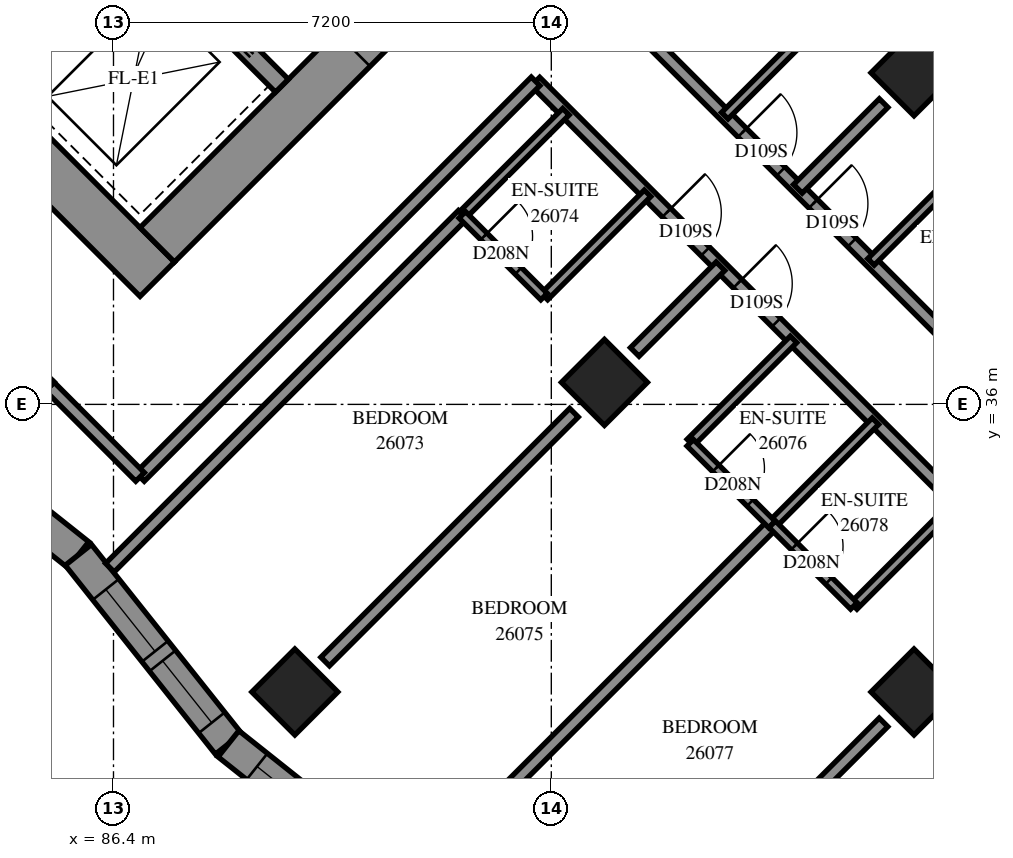
"""IFC4 building model, lengths in metres.
Left out: names, types, materials, properties, quantities, classifications, styles, units other than length and angle.
Written with IfcOpenShell. Run it as: python <this file> out.ifc"""

import sys

from ifc_helpers import new_model, si_unit, direction, frame, frame_2d, origin, origin_2d, place, context, subcontext, project, spatial, polyline, rectangle, outline, extrude, element, fill, save


model = new_model("IFC4")
c1 = context("Model", 3, precision=1e-05, world=origin(), true_north=direction((0.0, 1.0)))
c2 = subcontext(c1, "Body", "Model", "MODEL_VIEW")
j1 = project(units=[si_unit("LENGTHUNIT", "METRE"), si_unit("PLANEANGLEUNIT", "RADIAN")], contexts=[c1])
p1 = place(None, origin())
s1 = spatial("IfcSite", under=j1, at=p1, CompositionType="ELEMENT")
p2 = place(p1, origin())
s2 = spatial("IfcBuilding", under=s1, at=p2, CompositionType="ELEMENT")
p3 = place(p2, frame((0.0, 0.0, 98.2)))
s3 = spatial("IfcBuildingStorey", under=s2, at=p3, CompositionType="ELEMENT", Elevation=98.2)
for number, where, z_axis, x_axis in (
    (1, (99.565, 41.453, 0.0), (0.0, 0.0, 1.0), (0.707, -0.707, 0.0)),
    (2, (94.474, 36.362, 0.0), (0.0, 0.0, 1.0), (0.707, -0.707, 0.0)),
    (3, (89.382, 31.271, 0.0), (0.0, 0.0, 1.0), (0.707, -0.707, 0.0)),
    (4, (99.565, 31.271, 0.0), (0.0, 0.0, 1.0), (0.707, -0.707, 0.0)),
):
    element("IfcColumn", number, at=place(p3, frame(where, z_axis=z_axis, x_axis=x_axis)), inside=s3, PredefinedType="COLUMN", context=c2, shape_type="SweptSolid", body=[
        extrude(rectangle(XDim=1.0, YDim=1.0, at=origin_2d()), origin(), (0.0, 0.0, 1.0), 3.1),
    ])
p4 = place(p3, frame((75.806, 49.373, -0.3), z_axis=(0.0, 0.0, 1.0), x_axis=(0.7071067812, -0.7071067812, 0.0)))
e5 = element("IfcWall", 5, at=p4, inside=s3, PredefinedType="SHEAR", context=c2, shape_type="SweptSolid", body=[
    extrude(rectangle(XDim=16.0, YDim=0.8, at=frame_2d((8.0, 0.0))), origin(), (0.0, 0.0, 1.0), 2.7),
])
p5 = place(p3, frame((87.12, 38.625, -0.3), z_axis=(0.0, 0.0, 1.0), x_axis=(0.7071067812, 0.7071067812, 0.0)))
e6 = element("IfcWall", 6, at=p5, inside=s3, PredefinedType="SHEAR", context=c2, shape_type="SweptSolid", body=[
    extrude(rectangle(XDim=14.4, YDim=0.8, at=frame_2d((7.2, 0.0))), origin(), (0.0, 0.0, 1.0), 2.7),
])
p6 = place(p5, frame((4.55, 0.0, 0.3)))
e7 = element("IfcOpeningElement", 7, at=p6, cuts=e6, PredefinedType="OPENING", context=c2, shape_type="SweptSolid", body=[
    extrude(rectangle(XDim=1.1, YDim=2.1, at=frame_2d((0.55, 1.05))), frame((0.0, 0.41, 0.0), z_axis=(0.0, -1.0, 0.0), x_axis=(1.0, 0.0, 0.0)), (0.0, 0.0, 1.0), 0.82),
])
p7 = place(p5, frame((11.35, 0.0, 0.3)))
e8 = element("IfcOpeningElement", 8, at=p7, cuts=e6, PredefinedType="OPENING", context=c2, shape_type="SweptSolid", body=[
    extrude(rectangle(XDim=1.1, YDim=2.1, at=frame_2d((0.55, 1.05))), frame((0.0, 0.41, 0.0), z_axis=(0.0, -1.0, 0.0), x_axis=(1.0, 0.0, 0.0)), (0.0, 0.0, 1.0), 0.82),
])
p8 = place(p3, frame((84.291, 41.453, 0.0), z_axis=(0.0, 0.0, 1.0), x_axis=(0.7071067812, 0.7071067812, 0.0)))
e9 = element("IfcWall", 9, at=p8, inside=s3, PredefinedType="SOLIDWALL", context=c2, shape_type="SweptSolid", body=[
    extrude(rectangle(XDim=3.3, YDim=0.3, at=frame_2d((1.65, 0.0))), origin(), (0.0, 0.0, 1.0), 3.1),
])
p9 = place(p3, frame((78.988, 51.423, 0.0), z_axis=(0.0, 0.0, 1.0), x_axis=(0.7071067812, -0.7071067812, 0.0)))
e10 = element("IfcWall", 10, at=p9, inside=s3, PredefinedType="SOLIDWALL", context=c2, shape_type="SweptSolid", body=[
    extrude(rectangle(XDim=14.4, YDim=0.3, at=frame_2d((7.2, 0.0))), origin(), (0.0, 0.0, 1.0), 3.1),
])
p10 = place(p9, frame((1.25, 0.0, 0.0)))
e11 = element("IfcOpeningElement", 11, at=p10, cuts=e10, PredefinedType="OPENING", context=c2, shape_type="SweptSolid", body=[
    extrude(rectangle(XDim=1.1, YDim=2.1, at=frame_2d((0.55, 1.05))), frame((0.0, 0.16, 0.0), z_axis=(0.0, -1.0, 0.0), x_axis=(1.0, 0.0, 0.0)), (0.0, 0.0, 1.0), 0.32),
])
p11 = place(p9, frame((4.85, 0.0, 0.0)))
e12 = element("IfcOpeningElement", 12, at=p11, cuts=e10, PredefinedType="OPENING", context=c2, shape_type="SweptSolid", body=[
    extrude(rectangle(XDim=1.1, YDim=2.1, at=frame_2d((0.55, 1.05))), frame((0.0, 0.16, 0.0), z_axis=(0.0, -1.0, 0.0), x_axis=(1.0, 0.0, 0.0)), (0.0, 0.0, 1.0), 0.32),
])
p12 = place(p9, frame((8.45, 0.0, 0.0)))
e13 = element("IfcOpeningElement", 13, at=p12, cuts=e10, PredefinedType="OPENING", context=c2, shape_type="SweptSolid", body=[
    extrude(rectangle(XDim=1.1, YDim=2.1, at=frame_2d((0.55, 1.05))), frame((0.0, 0.16, 0.0), z_axis=(0.0, -1.0, 0.0), x_axis=(1.0, 0.0, 0.0)), (0.0, 0.0, 1.0), 0.32),
])
p13 = place(p9, frame((12.05, 0.0, 0.0)))
e14 = element("IfcOpeningElement", 14, at=p13, cuts=e10, PredefinedType="OPENING", context=c2, shape_type="SweptSolid", body=[
    extrude(rectangle(XDim=1.1, YDim=2.1, at=frame_2d((0.55, 1.05))), frame((0.0, 0.16, 0.0), z_axis=(0.0, -1.0, 0.0), x_axis=(1.0, 0.0, 0.0)), (0.0, 0.0, 1.0), 0.32),
])
p14 = place(p3, frame((82.716, 35.994, 0.0), z_axis=(0.0, 0.0, 1.0), x_axis=(0.7828931284, -0.6221562099, 0.0)))
e15 = element("IfcWall", 15, at=p14, inside=s3, PredefinedType="SOLIDWALL", context=c2, shape_type="SweptSolid", body=[
    extrude(outline(polyline([(-0.032, -0.275), (3.937, -0.275), (3.999, 0.275), (0.032, 0.275), (-0.032, -0.275)])), origin(), (0.0, 0.0, 1.0), 3.1),
])
p15 = place(p14, frame((1.714, 0.0, 0.5)))
e16 = element("IfcOpeningElement", 16, at=p15, cuts=e15, PredefinedType="OPENING", context=c2, shape_type="SweptSolid", body=[
    extrude(rectangle(XDim=1.2, YDim=2.45, at=frame_2d((0.6, 1.225))), frame((0.0, 0.285, 0.0), z_axis=(0.0, -1.0, 0.0), x_axis=(1.0, 0.0, 0.0)), (0.0, 0.0, 1.0), 0.57),
])
p16 = place(p3, frame((85.822, 33.525, 0.0), z_axis=(0.0, 0.0, 1.0), x_axis=(0.6221562099, -0.7828931284, 0.0)))
e17 = element("IfcWall", 17, at=p16, inside=s3, PredefinedType="SOLIDWALL", context=c2, shape_type="SweptSolid", body=[
    extrude(outline(polyline([(0.032, -0.275), (3.999, -0.275), (3.937, 0.275), (-0.032, 0.275), (0.032, -0.275)])), origin(), (0.0, 0.0, 1.0), 3.1),
])
p17 = place(p16, frame((0.726, 0.0, 0.5)))
e18 = element("IfcOpeningElement", 18, at=p17, cuts=e17, PredefinedType="OPENING", context=c2, shape_type="SweptSolid", body=[
    extrude(rectangle(XDim=1.3, YDim=2.45, at=frame_2d((0.65, 1.225))), frame((0.0, 0.285, 0.0), z_axis=(0.0, -1.0, 0.0), x_axis=(1.0, 0.0, 0.0)), (0.0, 0.0, 1.0), 0.57),
])
p18 = place(p16, frame((2.226, 0.0, 0.5)))
e19 = element("IfcOpeningElement", 19, at=p18, cuts=e17, PredefinedType="OPENING", context=c2, shape_type="SweptSolid", body=[
    extrude(rectangle(XDim=1.3, YDim=2.45, at=frame_2d((0.65, 1.225))), frame((0.0, 0.285, 0.0), z_axis=(0.0, -1.0, 0.0), x_axis=(1.0, 0.0, 0.0)), (0.0, 0.0, 1.0), 0.57),
])
p19 = place(p3, frame((88.291, 30.419, 0.0), z_axis=(0.0, 0.0, 1.0), x_axis=(0.7829028832, -0.6221439347, 0.0)))
e20 = element("IfcWall", 20, at=p19, inside=s3, PredefinedType="SOLIDWALL", context=c2, shape_type="SweptSolid", body=[
    extrude(outline(polyline([(-0.032, -0.275), (3.937, -0.275), (3.999, 0.275), (0.032, 0.275), (-0.032, -0.275)])), origin(), (0.0, 0.0, 1.0), 3.1),
])
p20 = place(p19, frame((0.6, 0.0, 0.5)))
e21 = element("IfcOpeningElement", 21, at=p20, cuts=e20, PredefinedType="OPENING", context=c2, shape_type="SweptSolid", body=[
    extrude(rectangle(XDim=1.3, YDim=2.45, at=frame_2d((0.65, 1.225))), frame((0.0, 0.285, 0.0), z_axis=(0.0, -1.0, 0.0), x_axis=(1.0, 0.0, 0.0)), (0.0, 0.0, 1.0), 0.57),
])
p21 = place(p19, frame((2.1, 0.0, 0.5)))
e22 = element("IfcOpeningElement", 22, at=p21, cuts=e20, PredefinedType="OPENING", context=c2, shape_type="SweptSolid", body=[
    extrude(rectangle(XDim=1.3, YDim=2.45, at=frame_2d((0.65, 1.225))), frame((0.0, 0.285, 0.0), z_axis=(0.0, -1.0, 0.0), x_axis=(1.0, 0.0, 0.0)), (0.0, 0.0, 1.0), 0.57),
])
p22 = place(p3, frame((93.339, 41.309, 0.0), z_axis=(0.0, 0.0, 1.0), x_axis=(0.7071067812, -0.7071067812, 0.0)))
e23 = element("IfcWall", 23, at=p22, inside=s3, PredefinedType="PARTITIONING", context=c2, shape_type="SweptSolid", body=[
    extrude(rectangle(XDim=18.702, YDim=0.2, at=frame_2d((9.351, 0.0))), origin(), (0.0, 0.0, 1.0), 3.1),
])
p23 = place(p22, frame((3.05, 0.0, 0.0)))
e24 = element("IfcOpeningElement", 24, at=p23, cuts=e23, PredefinedType="OPENING", context=c2, shape_type="SweptSolid", body=[
    extrude(rectangle(XDim=0.9, YDim=2.1, at=frame_2d((0.45, 1.05))), frame((0.0, 0.11, 0.0), z_axis=(0.0, -1.0, 0.0), x_axis=(1.0, 0.0, 0.0)), (0.0, 0.0, 1.0), 0.22),
])
p24 = place(p22, frame((4.7, 0.0, 0.0)))
e25 = element("IfcOpeningElement", 25, at=p24, cuts=e23, PredefinedType="OPENING", context=c2, shape_type="SweptSolid", body=[
    extrude(rectangle(XDim=0.9, YDim=2.1, at=frame_2d((0.45, 1.05))), frame((0.0, 0.11, 0.0), z_axis=(0.0, -1.0, 0.0), x_axis=(1.0, 0.0, 0.0)), (0.0, 0.0, 1.0), 0.22),
])
p25 = place(p22, frame((10.149, 0.0, 0.0)))
e26 = element("IfcOpeningElement", 26, at=p25, cuts=e23, PredefinedType="OPENING", context=c2, shape_type="SweptSolid", body=[
    extrude(rectangle(XDim=0.9, YDim=2.1, at=frame_2d((0.45, 1.05))), frame((0.0, 0.11, 0.0), z_axis=(0.0, -1.0, 0.0), x_axis=(1.0, 0.0, 0.0)), (0.0, 0.0, 1.0), 0.22),
])
p26 = place(p22, frame((11.9, 0.0, 0.0)))
e27 = element("IfcOpeningElement", 27, at=p26, cuts=e23, PredefinedType="OPENING", context=c2, shape_type="SweptSolid", body=[
    extrude(rectangle(XDim=0.9, YDim=2.1, at=frame_2d((0.45, 1.05))), frame((0.0, 0.11, 0.0), z_axis=(0.0, -1.0, 0.0), x_axis=(1.0, 0.0, 0.0)), (0.0, 0.0, 1.0), 0.22),
])
p27 = place(p22, frame((17.45, 0.0, 0.0)))
e28 = element("IfcOpeningElement", 28, at=p27, cuts=e23, PredefinedType="OPENING", context=c2, shape_type="SweptSolid", body=[
    extrude(rectangle(XDim=0.9, YDim=2.1, at=frame_2d((0.45, 1.05))), frame((0.0, 0.11, 0.0), z_axis=(0.0, -1.0, 0.0), x_axis=(1.0, 0.0, 0.0)), (0.0, 0.0, 1.0), 0.22),
])
p28 = place(p3, frame((86.835, 34.806, 0.0), z_axis=(0.0, 0.0, 1.0), x_axis=(0.7071067812, 0.7071067812, 0.0)))
e29 = element("IfcWall", 29, at=p28, inside=s3, PredefinedType="PARTITIONING", context=c2, shape_type="SweptSolid", body=[
    extrude(rectangle(XDim=9.201, YDim=0.2, at=frame_2d((4.601, 0.0))), origin(), (0.0, 0.0, 1.0), 3.1),
])
p29 = place(p3, frame((86.341, 33.315, 0.0), z_axis=(0.0, 0.0, 1.0), x_axis=(0.7069849041, 0.7072286373, 0.0)))
e30 = element("IfcWall", 30, at=p29, inside=s3, PredefinedType="PARTITIONING", context=c2, shape_type="SweptSolid", body=[
    extrude(rectangle(XDim=8.206, YDim=0.2, at=frame_2d((4.103, 0.0))), origin(), (0.0, 0.0, 1.0), 3.1),
])
p30 = place(p3, frame((91.46, 28.252, 0.0), z_axis=(0.0, 0.0, 1.0), x_axis=(0.7072292282, 0.706984313, 0.0)))
e31 = element("IfcWall", 31, at=p30, inside=s3, PredefinedType="PARTITIONING", context=c2, shape_type="SweptSolid", body=[
    extrude(rectangle(XDim=8.166, YDim=0.2, at=frame_2d((4.083, 0.0))), origin(), (0.0, 0.0, 1.0), 3.1),
])
p31 = place(p3, frame((94.62, 42.587, 0.0), z_axis=(0.0, 0.0, 1.0), x_axis=(0.7071067812, -0.7071067812, 0.0)))
e32 = element("IfcWall", 32, at=p31, inside=s3, PredefinedType="PARTITIONING", context=c2, shape_type="SweptSolid", body=[
    extrude(rectangle(XDim=7.9, YDim=0.2, at=frame_2d((3.95, 0.0))), origin(), (0.0, 0.0, 1.0), 3.1),
])
p32 = place(p31, frame((2.998, 0.0, 0.0)))
e33 = element("IfcOpeningElement", 33, at=p32, cuts=e32, PredefinedType="OPENING", context=c2, shape_type="SweptSolid", body=[
    extrude(rectangle(XDim=0.9, YDim=2.1, at=frame_2d((0.45, 1.05))), frame((0.0, 0.11, 0.0), z_axis=(0.0, -1.0, 0.0), x_axis=(1.0, 0.0, 0.0)), (0.0, 0.0, 1.0), 0.22),
])
p33 = place(p31, frame((4.649, 0.0, 0.0)))
e34 = element("IfcOpeningElement", 34, at=p33, cuts=e32, PredefinedType="OPENING", context=c2, shape_type="SweptSolid", body=[
    extrude(rectangle(XDim=0.9, YDim=2.1, at=frame_2d((0.45, 1.05))), frame((0.0, 0.11, 0.0), z_axis=(0.0, -1.0, 0.0), x_axis=(1.0, 0.0, 0.0)), (0.0, 0.0, 1.0), 0.22),
])
p34 = place(p3, frame((89.881, 31.771, 0.0), z_axis=(0.0, 0.0, 1.0), x_axis=(0.7071067812, 0.7071067812, 0.0)))
e35 = element("IfcWall", 35, at=p34, inside=s3, PredefinedType="PARTITIONING", context=c2, shape_type="SweptSolid", body=[
    extrude(rectangle(XDim=5.787, YDim=0.2, at=frame_2d((2.893, 0.0))), origin(), (0.0, 0.0, 1.0), 3.1),
])
p35 = place(p3, frame((94.973, 26.681, 0.0), z_axis=(0.0, 0.0, 1.0), x_axis=(0.7071067812, 0.7071067812, 0.0)))
e36 = element("IfcWall", 36, at=p35, inside=s3, PredefinedType="PARTITIONING", context=c2, shape_type="SweptSolid", body=[
    extrude(rectangle(XDim=5.784, YDim=0.2, at=frame_2d((2.892, 0.0))), origin(), (0.0, 0.0, 1.0), 3.1),
])
p36 = place(p3, frame((98.573, 32.685, 0.0), z_axis=(0.0, 0.0, 1.0), x_axis=(0.7071067812, 0.7071067812, 0.0)))
e37 = element("IfcWall", 37, at=p36, inside=s3, PredefinedType="PARTITIONING", context=c2, shape_type="SweptSolid", body=[
    extrude(rectangle(XDim=2.401, YDim=0.15, at=frame_2d((1.201, 0.0))), origin(), (0.0, 0.0, 1.0), 3.1),
])
for number, where, z_axis, x_axis in (
    (38, (92.143, 39.117, 0.0), (0.0, 0.0, 1.0), (0.708, 0.707, 0.0)),
    (39, (93.487, 37.773, 0.0), (0.0, 0.0, 1.0), (0.707, 0.708, 0.0)),
    (40, (97.234, 34.026, 0.0), (0.0, 0.0, 1.0), (0.707, 0.708, 0.0)),
):
    element("IfcWall", number, at=place(p3, frame(where, z_axis=z_axis, x_axis=x_axis)), inside=s3, PredefinedType="PARTITIONING", context=c2, shape_type="SweptSolid", body=[
        extrude(rectangle(XDim=2.4, YDim=0.15, at=frame_2d((1.2, 0.0))), origin(), (0.0, 0.0, 1.0), 3.1),
    ])
for number, where, z_axis, x_axis in (
    (41, (96.453, 40.747, 0.0), (0.0, 0.0, 1.0), (0.707, 0.707, 0.0)),
    (42, (95.887, 35.373, 0.0), (0.0, 0.0, 1.0), (0.707, 0.707, 0.0)),
    (43, (98.857, 38.343, 0.0), (0.0, 0.0, 1.0), (0.707, 0.707, 0.0)),
):
    element("IfcWall", number, at=place(p3, frame(where, z_axis=z_axis, x_axis=x_axis)), inside=s3, PredefinedType="PARTITIONING", context=c2, shape_type="SweptSolid", body=[
        extrude(rectangle(XDim=2.398, YDim=0.15, at=frame_2d((1.199, 0.0))), origin(), (0.0, 0.0, 1.0), 3.1),
    ])
p37 = place(p3, frame((85.353, 36.293, 0.0), z_axis=(0.0, 0.0, 1.0), x_axis=(0.7066304548, -0.7075827869, 0.0)))
e44 = element("IfcWall", 44, at=p37, inside=s3, PredefinedType="PARTITIONING", context=c2, shape_type="SweptSolid", body=[
    extrude(rectangle(XDim=2.1, YDim=0.2, at=frame_2d((1.05, 0.0))), origin(), (0.0, 0.0, 1.0), 3.1),
])
for number, where, z_axis, x_axis in (
    (45, (97.655, 39.545, 0.0), (0.0, 0.0, 1.0), (0.707, 0.707, 0.0)),
    (46, (94.972, 36.862, 0.0), (0.0, 0.0, 1.0), (0.707, 0.707, 0.0)),
):
    element("IfcWall", number, at=place(p3, frame(where, z_axis=z_axis, x_axis=x_axis)), inside=s3, PredefinedType="PARTITIONING", context=c2, shape_type="SweptSolid", body=[
        extrude(rectangle(XDim=1.994, YDim=0.2, at=frame_2d((0.997, 0.0))), origin(), (0.0, 0.0, 1.0), 3.1),
    ])
p38 = place(p3, frame((95.885, 35.369, 0.0), z_axis=(0.0, 0.0, 1.0), x_axis=(0.7071067812, -0.7071067812, 0.0)))
e47 = element("IfcWall", 47, at=p38, inside=s3, PredefinedType="PARTITIONING", context=c2, shape_type="SweptSolid", body=[
    extrude(rectangle(XDim=1.901, YDim=0.15, at=frame_2d((0.95, 0.0))), origin(), (0.0, 0.0, 1.0), 3.1),
])
p39 = place(p38, frame((0.595, 0.0, 0.0)))
e48 = element("IfcOpeningElement", 48, at=p39, cuts=e47, PredefinedType="OPENING", context=c2, shape_type="SweptSolid", body=[
    extrude(rectangle(XDim=0.8, YDim=2.1, at=frame_2d((0.4, 1.05))), frame((0.0, 0.085, 0.0), z_axis=(0.0, -1.0, 0.0), x_axis=(1.0, 0.0, 0.0)), (0.0, 0.0, 1.0), 0.17),
])
p40 = place(p3, frame((92.137, 39.117, 0.0), z_axis=(0.0, 0.0, 1.0), x_axis=(0.7071067812, -0.7071067812, 0.0)))
e49 = element("IfcWall", 49, at=p40, inside=s3, PredefinedType="PARTITIONING", context=c2, shape_type="SweptSolid", body=[
    extrude(rectangle(XDim=1.901, YDim=0.15, at=frame_2d((0.95, 0.0))), origin(), (0.0, 0.0, 1.0), 3.1),
])
p41 = place(p40, frame((0.502, 0.0, 0.0)))
e50 = element("IfcOpeningElement", 50, at=p41, cuts=e49, PredefinedType="OPENING", context=c2, shape_type="SweptSolid", body=[
    extrude(rectangle(XDim=0.8, YDim=2.1, at=frame_2d((0.4, 1.05))), frame((0.0, 0.085, 0.0), z_axis=(0.0, -1.0, 0.0), x_axis=(1.0, 0.0, 0.0)), (0.0, 0.0, 1.0), 0.17),
])
p42 = place(p3, frame((97.233, 34.029, 0.0), z_axis=(0.0, 0.0, 1.0), x_axis=(0.7065800724, -0.7076330979, 0.0)))
e51 = element("IfcWall", 51, at=p42, inside=s3, PredefinedType="PARTITIONING", context=c2, shape_type="SweptSolid", body=[
    extrude(rectangle(XDim=1.899, YDim=0.15, at=frame_2d((0.95, 0.0))), origin(), (0.0, 0.0, 1.0), 3.1),
])
p43 = place(p42, frame((0.515, 0.0, 0.0)))
e52 = element("IfcOpeningElement", 52, at=p43, cuts=e51, PredefinedType="OPENING", context=c2, shape_type="SweptSolid", body=[
    extrude(rectangle(XDim=0.8, YDim=2.1, at=frame_2d((0.4, 1.05))), frame((0.0, 0.085, 0.0), z_axis=(0.0, -1.0, 0.0), x_axis=(1.0, 0.0, 0.0)), (0.0, 0.0, 1.0), 0.17),
])
p44 = place(p3, frame((84.795, 36.855, 0.0), z_axis=(0.0, 0.0, 1.0), x_axis=(0.7071067812, -0.7071067812, 0.0)))
e53 = element("IfcWall", 53, at=p44, inside=s3, PredefinedType="PARTITIONING", context=c2, shape_type="SweptSolid", body=[
    extrude(rectangle(XDim=0.792, YDim=0.2, at=frame_2d((0.396, 0.0))), origin(), (0.0, 0.0, 1.0), 3.1),
])
p45 = place(p17, origin())
e54 = element("IfcWindow", 54, at=p45, inside=s3, PartitioningType="SINGLE_PANEL", PredefinedType="WINDOW", context=c2, shape_type="SweptSolid", body=[
    extrude(rectangle(XDim=1.3, YDim=2.45, at=frame_2d((0.65, 1.225))), frame((0.0, 0.155, 0.0), z_axis=(0.0, -1.0, 0.0), x_axis=(1.0, 0.0, 0.0)), (0.0, 0.0, 1.0), 0.06),
])
fill(e18, e54)
p46 = place(p18, origin())
e55 = element("IfcWindow", 55, at=p46, inside=s3, PartitioningType="SINGLE_PANEL", PredefinedType="WINDOW", context=c2, shape_type="SweptSolid", body=[
    extrude(rectangle(XDim=1.3, YDim=2.45, at=frame_2d((0.65, 1.225))), frame((0.0, 0.155, 0.0), z_axis=(0.0, -1.0, 0.0), x_axis=(1.0, 0.0, 0.0)), (0.0, 0.0, 1.0), 0.06),
])
fill(e19, e55)
p47 = place(p20, origin())
e56 = element("IfcWindow", 56, at=p47, inside=s3, PartitioningType="SINGLE_PANEL", PredefinedType="WINDOW", context=c2, shape_type="SweptSolid", body=[
    extrude(rectangle(XDim=1.3, YDim=2.45, at=frame_2d((0.65, 1.225))), frame((0.0, 0.155, 0.0), z_axis=(0.0, -1.0, 0.0), x_axis=(1.0, 0.0, 0.0)), (0.0, 0.0, 1.0), 0.06),
])
fill(e21, e56)
p48 = place(p32, origin())
e57 = element("IfcDoor", 57, at=p48, inside=s3, OperationType="SINGLE_SWING_RIGHT", PredefinedType="DOOR", context=c2, shape_type="SweptSolid", body=[
    extrude(rectangle(XDim=0.9, YDim=2.1, at=frame_2d((0.45, 1.05))), frame((0.0, 0.025, 0.0), z_axis=(0.0, -1.0, 0.0), x_axis=(1.0, 0.0, 0.0)), (0.0, 0.0, 1.0), 0.05),
])
fill(e33, e57)
p49 = place(p33, origin())
e58 = element("IfcDoor", 58, at=p49, inside=s3, OperationType="SINGLE_SWING_LEFT", PredefinedType="DOOR", context=c2, shape_type="SweptSolid", body=[
    extrude(rectangle(XDim=0.9, YDim=2.1, at=frame_2d((0.45, 1.05))), frame((0.0, 0.025, 0.0), z_axis=(0.0, -1.0, 0.0), x_axis=(1.0, 0.0, 0.0)), (0.0, 0.0, 1.0), 0.05),
])
fill(e34, e58)
p50 = place(p23, origin())
e59 = element("IfcDoor", 59, at=p50, inside=s3, OperationType="SINGLE_SWING_LEFT", PredefinedType="DOOR", context=c2, shape_type="SweptSolid", body=[
    extrude(rectangle(XDim=0.9, YDim=2.1, at=frame_2d((0.45, 1.05))), frame((0.0, 0.025, 0.0), z_axis=(0.0, -1.0, 0.0), x_axis=(1.0, 0.0, 0.0)), (0.0, 0.0, 1.0), 0.05),
])
fill(e24, e59)
p51 = place(p41, origin())
e60 = element("IfcDoor", 60, at=p51, inside=s3, OperationType="SINGLE_SWING_RIGHT", PredefinedType="DOOR", context=c2, shape_type="SweptSolid", body=[
    extrude(rectangle(XDim=0.8, YDim=2.1, at=frame_2d((0.4, 1.05))), frame((0.0, 0.025, 0.0), z_axis=(0.0, -1.0, 0.0), x_axis=(1.0, 0.0, 0.0)), (0.0, 0.0, 1.0), 0.05),
])
fill(e50, e60)
p52 = place(p24, origin())
e61 = element("IfcDoor", 61, at=p52, inside=s3, OperationType="SINGLE_SWING_RIGHT", PredefinedType="DOOR", context=c2, shape_type="SweptSolid", body=[
    extrude(rectangle(XDim=0.9, YDim=2.1, at=frame_2d((0.45, 1.05))), frame((0.0, 0.025, 0.0), z_axis=(0.0, -1.0, 0.0), x_axis=(1.0, 0.0, 0.0)), (0.0, 0.0, 1.0), 0.05),
])
fill(e25, e61)
p53 = place(p39, origin())
e62 = element("IfcDoor", 62, at=p53, inside=s3, OperationType="SINGLE_SWING_RIGHT", PredefinedType="DOOR", context=c2, shape_type="SweptSolid", body=[
    extrude(rectangle(XDim=0.8, YDim=2.1, at=frame_2d((0.4, 1.05))), frame((0.0, 0.025, 0.0), z_axis=(0.0, -1.0, 0.0), x_axis=(1.0, 0.0, 0.0)), (0.0, 0.0, 1.0), 0.05),
])
fill(e48, e62)
p54 = place(p43, origin())
e63 = element("IfcDoor", 63, at=p54, inside=s3, OperationType="SINGLE_SWING_RIGHT", PredefinedType="DOOR", context=c2, shape_type="SweptSolid", body=[
    extrude(rectangle(XDim=0.8, YDim=2.1, at=frame_2d((0.4, 1.05))), frame((0.0, 0.025, 0.0), z_axis=(0.0, -1.0, 0.0), x_axis=(1.0, 0.0, 0.0)), (0.0, 0.0, 1.0), 0.05),
])
fill(e52, e63)
save(model, sys.argv[1])
